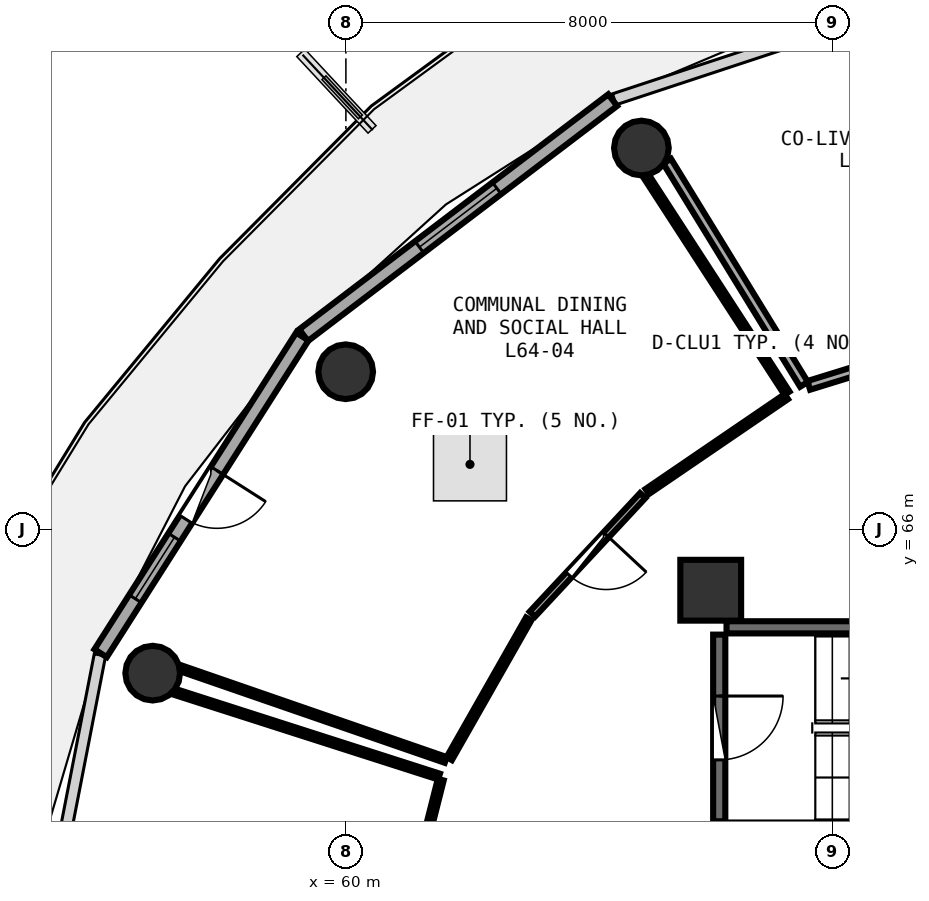
"""IFC4 building model, lengths in metres.
Left out: names, types, materials, properties, quantities, classifications, styles, units other than length and angle.
Written with IfcOpenShell. Run it as: python <this file> out.ifc"""

import sys

from ifc_helpers import new_model, si_unit, direction, frame, frame_2d, origin, origin_2d, place, context, subcontext, project, spatial, rectangle, circle, extrude, element, fill, save


model = new_model("IFC4")
c1 = context("Model", 3, precision=1e-05, world=origin(), true_north=direction((0.0, 1.0)))
c2 = subcontext(c1, "Body", "Model", "MODEL_VIEW")
j1 = project(units=[si_unit("LENGTHUNIT", "METRE"), si_unit("PLANEANGLEUNIT", "RADIAN")], contexts=[c1])
p1 = place(None, origin())
s1 = spatial("IfcSite", under=j1, at=p1, CompositionType="ELEMENT")
p2 = place(p1, origin())
s2 = spatial("IfcBuilding", under=s1, at=p2, CompositionType="ELEMENT")
p3 = place(p2, frame((0.0, 0.0, 252.45)))
s3 = spatial("IfcBuildingStorey", under=s2, at=p3, CompositionType="ELEMENT", Elevation=252.45)
p4 = place(p3, frame((66.0, 65.0, 0.0), z_axis=(0.0, 0.0, 1.0), x_axis=(1.0, 0.0, 0.0)))
e1 = element("IfcColumn", 1, at=p4, inside=s3, PredefinedType="PILASTER", context=c2, shape_type="SweptSolid", body=[
    extrude(rectangle(XDim=1.0, YDim=1.0, at=origin_2d()), origin(), (0.0, 0.0, 1.0), 3.75),
])
for number, where, z_axis, x_axis in (
    (2, (64.86, 72.272, 0.0), (0.0, 0.0, 1.0), (1.0, 0.0, 0.0)),
    (3, (59.997, 68.593, 0.0), (0.0, 0.0, 1.0), (1.0, 0.0, 0.0)),
    (4, (56.823, 63.636, 0.0), (0.0, 0.0, 1.0), (1.0, 0.0, 0.0)),
):
    element("IfcColumn", number, at=place(p3, frame(where, z_axis=z_axis, x_axis=x_axis)), inside=s3, PredefinedType="COLUMN", context=c2, shape_type="SweptSolid", body=[
        extrude(circle(Radius=0.45, at=origin_2d()), origin(), (0.0, 0.0, 1.0), 3.75),
    ])
p5 = place(p3, frame((64.388, 73.06, 0.0), z_axis=(0.0, 0.0, 1.0), x_axis=(-0.796010444211, -0.605282886514, 0.0)))
e5 = element("IfcWall", 5, at=p5, inside=s3, PredefinedType="SOLIDWALL", context=c2, shape_type="SweptSolid", body=[
    extrude(rectangle(XDim=6.387, YDim=0.24, at=frame_2d((3.194, 0.0))), origin(), (0.0, 0.0, 1.0), 3.475),
])
p6 = place(p5, frame((2.394, 0.0, 0.85)))
e6 = element("IfcOpeningElement", 6, at=p6, cuts=e5, PredefinedType="OPENING", context=c2, shape_type="SweptSolid", body=[
    extrude(rectangle(XDim=1.6, YDim=1.45, at=frame_2d((0.8, 0.725))), frame((0.0, 0.13, 0.0), z_axis=(0.0, -1.0, 0.0), x_axis=(1.0, 0.0, 0.0)), (0.0, 0.0, 1.0), 0.26),
])
p7 = place(p3, frame((59.284, 69.172, 0.0), z_axis=(0.0, 0.0, 1.0), x_axis=(-0.537271968456, -0.843409053728, 0.0)))
e7 = element("IfcWall", 7, at=p7, inside=s3, PredefinedType="SOLIDWALL", context=c2, shape_type="SweptSolid", body=[
    extrude(rectangle(XDim=6.175, YDim=0.24, at=frame_2d((3.087, 0.0))), origin(), (0.0, 0.0, 1.0), 3.475),
])
p8 = place(p7, frame((2.613, 0.0, 0.0)))
e8 = element("IfcOpeningElement", 8, at=p8, cuts=e7, PredefinedType="OPENING", context=c2, shape_type="SweptSolid", body=[
    extrude(rectangle(XDim=0.95, YDim=2.1, at=frame_2d((0.475, 1.05))), frame((0.0, 0.13, 0.0), z_axis=(0.0, -1.0, 0.0), x_axis=(1.0, 0.0, 0.0)), (0.0, 0.0, 1.0), 0.26),
])
p9 = place(p7, frame((3.913, 0.0, 0.85)))
e9 = element("IfcOpeningElement", 9, at=p9, cuts=e7, PredefinedType="OPENING", context=c2, shape_type="SweptSolid", body=[
    extrude(rectangle(XDim=1.2, YDim=1.45, at=frame_2d((0.6, 0.725))), frame((0.0, 0.13, 0.0), z_axis=(0.0, -1.0, 0.0), x_axis=(1.0, 0.0, 0.0)), (0.0, 0.0, 1.0), 0.26),
])
p10 = place(p3, frame((73.42, 64.39, 0.0), z_axis=(0.0, 0.0, 1.0), x_axis=(-1.0, 0.0, 0.0)))
e10 = element("IfcWall", 10, at=p10, inside=s3, PredefinedType="SHEAR", context=c2, shape_type="SweptSolid", body=[
    extrude(rectangle(XDim=7.16, YDim=0.2, at=frame_2d((3.58, 0.0))), origin(), (0.0, 0.0, 1.0), 3.49),
])
p11 = place(p3, frame((66.14, 64.27, 0.0), z_axis=(0.0, 0.0, 1.0), x_axis=(0.0, -1.0, 0.0)))
e11 = element("IfcWall", 11, at=p11, inside=s3, PredefinedType="SHEAR", context=c2, shape_type="SweptSolid", body=[
    extrude(rectangle(XDim=3.07, YDim=0.2, at=frame_2d((1.535, 0.0))), origin(), (0.0, 0.0, 1.0), 3.49),
])
p12 = place(p11, frame((1.01, 0.0, 0.0)))
e12 = element("IfcOpeningElement", 12, at=p12, cuts=e11, PredefinedType="OPENING", context=c2, shape_type="SweptSolid", body=[
    extrude(rectangle(XDim=1.05, YDim=2.1, at=frame_2d((0.525, 1.05))), frame((0.0, 0.11, 0.0), z_axis=(0.0, -1.0, 0.0), x_axis=(1.0, 0.0, 0.0)), (0.0, 0.0, 1.0), 0.22),
])
p13 = place(p3, frame((71.989, 69.721, 0.0), z_axis=(0.0, 0.0, 1.0), x_axis=(-0.955414123224, -0.295269119863, 0.0)))
e13 = element("IfcWall", 13, at=p13, inside=s3, PredefinedType="PARTITIONING", context=c2, shape_type="SweptSolid", body=[
    extrude(rectangle(XDim=4.581, YDim=0.15, at=frame_2d((2.291, 0.0))), origin(), (0.0, 0.0, 1.0), 3.075),
])
p14 = place(p13, frame((1.815, 0.0, 0.0)))
e14 = element("IfcOpeningElement", 14, at=p14, cuts=e13, PredefinedType="OPENING", context=c2, shape_type="SweptSolid", body=[
    extrude(rectangle(XDim=0.95, YDim=2.08, at=frame_2d((0.475, 1.04))), frame((0.0, 0.085, 0.0), z_axis=(0.0, -1.0, 0.0), x_axis=(1.0, 0.0, 0.0)), (0.0, 0.0, 1.0), 0.17),
])
p15 = place(p3, frame((64.882, 66.557, 0.0), z_axis=(0.0, 0.0, 1.0), x_axis=(-0.681315269885, -0.731990097625, 0.0)))
e15 = element("IfcWall", 15, at=p15, inside=s3, PredefinedType="PARTITIONING", context=c2, shape_type="SweptSolid", body=[
    extrude(rectangle(XDim=2.664, YDim=0.12, at=frame_2d((1.332, 0.0))), origin(), (0.0, 0.0, 1.0), 3.075),
])
p16 = place(p15, frame((0.882, 0.0, 0.0)))
e16 = element("IfcOpeningElement", 16, at=p16, cuts=e15, PredefinedType="OPENING", context=c2, shape_type="SweptSolid", body=[
    extrude(rectangle(XDim=0.9, YDim=2.08, at=frame_2d((0.45, 1.04))), frame((0.0, 0.07, 0.0), z_axis=(0.0, -1.0, 0.0), x_axis=(1.0, 0.0, 0.0)), (0.0, 0.0, 1.0), 0.14),
])
p17 = place(p3, frame((67.534, 68.385, 0.0), z_axis=(0.0, 0.0, 1.0), x_axis=(-0.522784059663, 0.852465147066, 0.0)))
e17 = element("IfcWall", 17, at=p17, inside=s3, PredefinedType="PARTITIONING", context=c2, shape_type="SweptSolid", body=[
    extrude(rectangle(XDim=4.306, YDim=0.15, at=frame_2d((2.153, 0.0))), origin(), (0.0, 0.0, 1.0), 3.175),
])
p18 = place(p3, frame((67.243, 68.184, 0.0), z_axis=(0.0, 0.0, 1.0), x_axis=(-0.826087380575, -0.563542047814, 0.0)))
e18 = element("IfcWall", 18, at=p18, inside=s3, PredefinedType="PARTITIONING", context=c2, shape_type="SweptSolid", body=[
    extrude(rectangle(XDim=2.768, YDim=0.1, at=frame_2d((1.384, 0.0))), origin(), (0.0, 0.0, 1.0), 3.075),
])
p19 = place(p3, frame((63.006, 64.528, 0.0), z_axis=(0.0, 0.0, 1.0), x_axis=(-0.494277588427, -0.869304127207, 0.0)))
e19 = element("IfcWall", 19, at=p19, inside=s3, PredefinedType="PARTITIONING", context=c2, shape_type="SweptSolid", body=[
    extrude(rectangle(XDim=2.643, YDim=0.1, at=frame_2d((1.322, 0.0))), origin(), (0.0, 0.0, 1.0), 3.075),
])
p20 = place(p3, frame((61.642, 62.209, 0.0), z_axis=(0.0, 0.0, 1.0), x_axis=(-0.945103281494, 0.326771766388, 0.0)))
e20 = element("IfcWall", 20, at=p20, inside=s3, PredefinedType="PARTITIONING", context=c2, shape_type="SweptSolid", body=[
    extrude(rectangle(XDim=4.604, YDim=0.1, at=frame_2d((2.302, 0.0))), origin(), (0.0, 0.0, 1.0), 3.075),
])
p21 = place(p3, frame((64.942, 71.804, 0.0), z_axis=(0.0, 0.0, 1.0), x_axis=(0.544234825024, -0.838932926539, 0.0)))
e21 = element("IfcWall", 21, at=p21, inside=s3, PredefinedType="PARTITIONING", context=c2, shape_type="SweptSolid", body=[
    extrude(rectangle(XDim=4.249, YDim=0.1, at=frame_2d((2.125, 0.0))), origin(), (0.0, 0.0, 1.0), 3.075),
])
p22 = place(p3, frame((61.56, 61.884, 0.0), z_axis=(0.0, 0.0, 1.0), x_axis=(-0.245655775867, -0.969357127061, 0.0)))
e22 = element("IfcWall", 22, at=p22, inside=s3, PredefinedType="PARTITIONING", context=c2, shape_type="SweptSolid", body=[
    extrude(rectangle(XDim=2.595, YDim=0.1, at=frame_2d((1.297, 0.0))), origin(), (0.0, 0.0, 1.0), 3.48),
])
p23 = place(p3, frame((57.184, 63.329, 0.0), z_axis=(0.0, 0.0, 1.0), x_axis=(0.95227750557, -0.305233602976, 0.0)))
e23 = element("IfcWall", 23, at=p23, inside=s3, PredefinedType="PARTITIONING", context=c2, shape_type="SweptSolid", body=[
    extrude(rectangle(XDim=4.565, YDim=0.1, at=frame_2d((2.283, 0.0))), origin(), (0.0, 0.0, 1.0), 3.175),
])
p24 = place(p6, origin())
e24 = element("IfcWindow", 24, at=p24, inside=s3, PartitioningType="SINGLE_PANEL", PredefinedType="WINDOW", context=c2, shape_type="SweptSolid", body=[
    extrude(rectangle(XDim=1.6, YDim=1.45, at=frame_2d((0.8, 0.725))), frame((0.0, 0.03, 0.0), z_axis=(0.0, -1.0, 0.0), x_axis=(1.0, 0.0, 0.0)), (0.0, 0.0, 1.0), 0.06),
])
fill(e6, e24)
p25 = place(p8, frame((0.95, 0.0, 0.0), z_axis=(0.0, 0.0, 1.0), x_axis=(-1.0, 0.0, 0.0)))
e25 = element("IfcDoor", 25, at=p25, inside=s3, OperationType="SINGLE_SWING_RIGHT", PredefinedType="DOOR", context=c2, shape_type="SweptSolid", body=[
    extrude(rectangle(XDim=0.95, YDim=2.1, at=frame_2d((0.475, 1.05))), frame((0.0, 0.025, 0.0), z_axis=(0.0, -1.0, 0.0), x_axis=(1.0, 0.0, 0.0)), (0.0, 0.0, 1.0), 0.05),
])
fill(e8, e25)
p26 = place(p9, origin())
e26 = element("IfcWindow", 26, at=p26, inside=s3, PartitioningType="SINGLE_PANEL", PredefinedType="WINDOW", context=c2, shape_type="SweptSolid", body=[
    extrude(rectangle(XDim=1.2, YDim=1.45, at=frame_2d((0.6, 0.725))), frame((0.0, 0.03, 0.0), z_axis=(0.0, -1.0, 0.0), x_axis=(1.0, 0.0, 0.0)), (0.0, 0.0, 1.0), 0.06),
])
fill(e9, e26)
p27 = place(p12, origin())
e27 = element("IfcDoor", 27, at=p27, inside=s3, OperationType="SINGLE_SWING_LEFT", PredefinedType="DOOR", context=c2, shape_type="SweptSolid", body=[
    extrude(rectangle(XDim=1.05, YDim=2.1, at=frame_2d((0.525, 1.05))), frame((0.0, 0.025, 0.0), z_axis=(0.0, -1.0, 0.0), x_axis=(1.0, 0.0, 0.0)), (0.0, 0.0, 1.0), 0.05),
])
fill(e12, e27)
p28 = place(p16, origin())
e28 = element("IfcDoor", 28, at=p28, inside=s3, OperationType="SINGLE_SWING_LEFT", PredefinedType="DOOR", context=c2, shape_type="SweptSolid", body=[
    extrude(rectangle(XDim=0.9, YDim=2.08, at=frame_2d((0.45, 1.04))), frame((0.0, 0.025, 0.0), z_axis=(0.0, -1.0, 0.0), x_axis=(1.0, 0.0, 0.0)), (0.0, 0.0, 1.0), 0.05),
])
fill(e16, e28)
save(model, sys.argv[1])
